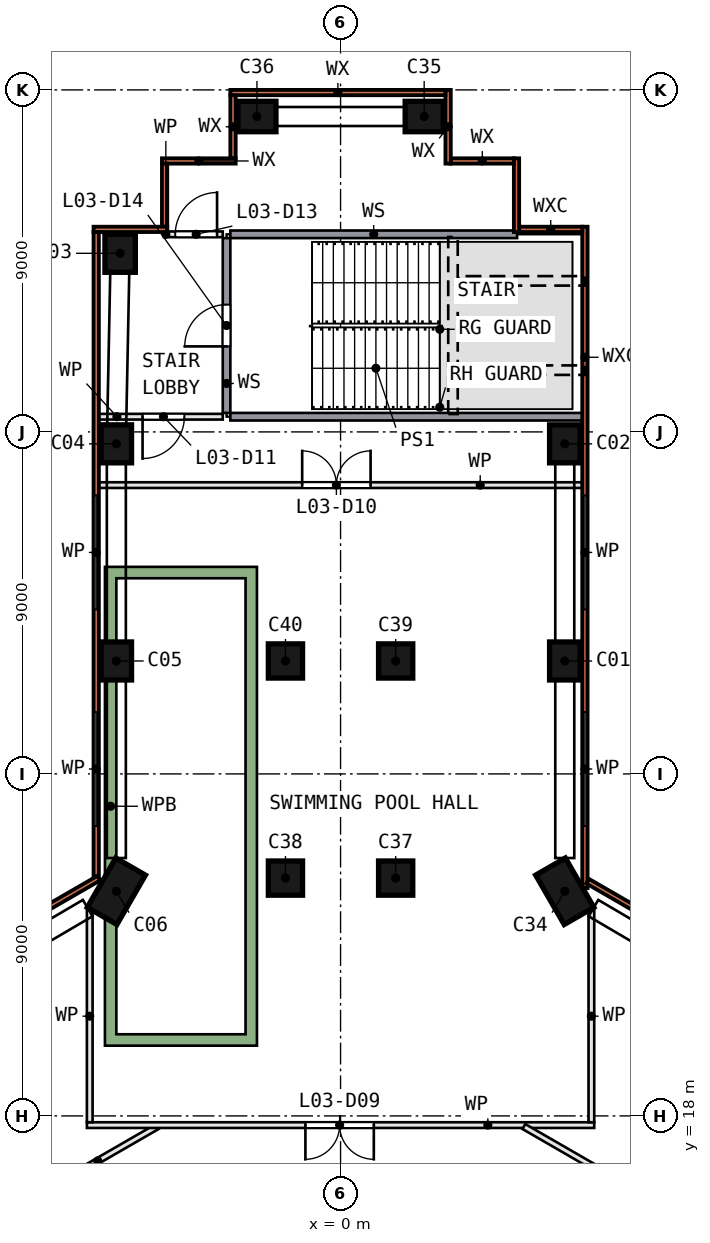
"""IFC4 building model, lengths in metres.
Left out: names, types, materials, properties, quantities, classifications, styles, units other than length and angle.
Written with IfcOpenShell. Run it as: python <this file> out.ifc"""

import sys

from ifc_helpers import new_model, si_unit, direction, frame, frame_2d, origin, origin_2d, place, context, subcontext, project, spatial, polyline, rectangle, outline, extrude, element, fill, save


model = new_model("IFC4")
c1 = context("Model", 3, precision=1e-05, world=origin(), true_north=direction((0.0, 1.0)))
c2 = subcontext(c1, "Body", "Model", "MODEL_VIEW")
j1 = project(units=[si_unit("LENGTHUNIT", "METRE"), si_unit("PLANEANGLEUNIT", "RADIAN")], contexts=[c1])
p1 = place(None, origin())
s1 = spatial("IfcSite", under=j1, at=p1, CompositionType="ELEMENT")
p2 = place(p1, origin())
s2 = spatial("IfcBuilding", under=s1, at=p2, CompositionType="ELEMENT")
p3 = place(p2, frame((0.0, 0.0, 19.0)))
s3 = spatial("IfcBuildingStorey", under=s2, at=p3, CompositionType="ELEMENT", Elevation=19.0)
for number, where, z_axis, x_axis in (
    (1, (5.9, 29.972, 0.0), (0.0, 0.0, 1.0), (0.0, 1.0, 0.0)),
    (2, (5.9, 35.686, 0.0), (0.0, 0.0, 1.0), (0.0, 1.0, 0.0)),
    (3, (-5.8, 40.7, 0.0), (0.0, 0.0, 1.0), (0.0, -1.0, 0.0)),
    (4, (-5.9, 35.686, 0.0), (0.0, 0.0, 1.0), (0.0, -1.0, 0.0)),
    (5, (-5.9, 29.972, 0.0), (0.0, 0.0, 1.0), (0.0, -1.0, 0.0)),
):
    element("IfcColumn", number, at=place(p3, frame(where, z_axis=z_axis, x_axis=x_axis)), inside=s3, PredefinedType="COLUMN", context=c2, shape_type="SweptSolid", body=[
        extrude(rectangle(XDim=1.0, YDim=0.8, at=origin_2d()), origin(), (0.0, 0.0, 1.0), 4.05),
    ])
for number, where, z_axis, x_axis in (
    (6, (-5.9, 23.912, 0.0), (0.0, 0.0, 1.0), (0.5, 0.866, 0.0)),
    (7, (5.9, 23.912, 0.0), (0.0, 0.0, 1.0), (0.5, -0.866, 0.0)),
):
    element("IfcColumn", number, at=place(p3, frame(where, z_axis=z_axis, x_axis=x_axis)), inside=s3, PredefinedType="COLUMN", context=c2, shape_type="SweptSolid", body=[
        extrude(rectangle(XDim=1.5, YDim=0.9, at=origin_2d()), origin(), (0.0, 0.0, 1.0), 4.05),
    ])
for number, where, z_axis, x_axis in (
    (8, (2.2, 44.3, 0.0), (0.0, 0.0, 1.0), (-1.0, 0.0, 0.0)),
    (9, (-2.2, 44.3, 0.0), (0.0, 0.0, 1.0), (-1.0, 0.0, 0.0)),
):
    element("IfcColumn", number, at=place(p3, frame(where, z_axis=z_axis, x_axis=x_axis)), inside=s3, PredefinedType="COLUMN", context=c2, shape_type="SweptSolid", body=[
        extrude(rectangle(XDim=1.0, YDim=0.8, at=origin_2d()), origin(), (0.0, 0.0, 1.0), 4.05),
    ])
for number, where, z_axis, x_axis in (
    (10, (1.45, 24.258, 0.0), (0.0, 0.0, 1.0), (0.0, 1.0, 0.0)),
    (11, (-1.45, 24.258, 0.0), (0.0, 0.0, 1.0), (0.0, 1.0, 0.0)),
    (12, (1.45, 29.972, 0.0), (0.0, 0.0, 1.0), (0.0, 1.0, 0.0)),
    (13, (-1.45, 29.972, 0.0), (0.0, 0.0, 1.0), (0.0, 1.0, 0.0)),
):
    element("IfcColumn", number, at=place(p3, frame(where, z_axis=z_axis, x_axis=x_axis)), inside=s3, PredefinedType="COLUMN", context=c2, shape_type="SweptSolid", body=[
        extrude(rectangle(XDim=0.9, YDim=0.9, at=origin_2d()), origin(), (0.0, 0.0, 1.0), 4.05),
    ])
p4 = place(p3, frame((6.43, 23.995, 0.0), z_axis=(0.0, 0.0, 1.0), x_axis=(0.0, 1.0, 0.0)))
e14 = element("IfcWall", 14, at=p4, inside=s3, PredefinedType="SOLIDWALL", context=c2, shape_type="SweptSolid", body=[
    extrude(rectangle(XDim=17.405, YDim=0.14, at=frame_2d((8.702, 0.0))), origin(), (0.0, 0.0, 1.0), 4.05),
])
p5 = place(p4, frame((1.634, 0.0, 0.9)))
e15 = element("IfcOpeningElement", 15, at=p5, cuts=e14, PredefinedType="OPENING", context=c2, shape_type="SweptSolid", body=[
    extrude(rectangle(XDim=3.0, YDim=2.4, at=frame_2d((1.5, 1.2))), frame((0.0, 0.08, 0.0), z_axis=(0.0, -1.0, 0.0), x_axis=(1.0, 0.0, 0.0)), (0.0, 0.0, 1.0), 0.16),
])
p6 = place(p4, frame((7.334, 0.0, 0.9)))
e16 = element("IfcOpeningElement", 16, at=p6, cuts=e14, PredefinedType="OPENING", context=c2, shape_type="SweptSolid", body=[
    extrude(rectangle(XDim=3.0, YDim=2.4, at=frame_2d((1.5, 1.2))), frame((0.0, 0.08, 0.0), z_axis=(0.0, -1.0, 0.0), x_axis=(1.0, 0.0, 0.0)), (0.0, 0.0, 1.0), 0.16),
])
p7 = place(p3, frame((6.36, 41.33, 0.0), z_axis=(0.0, 0.0, 1.0), x_axis=(-1.0, 0.0, 0.0)))
e17 = element("IfcWall", 17, at=p7, inside=s3, PredefinedType="SOLIDWALL", context=c2, shape_type="SweptSolid", body=[
    extrude(rectangle(XDim=1.66, YDim=0.14, at=frame_2d((0.83, 0.0))), origin(), (0.0, 0.0, 1.0), 4.05),
])
p8 = place(p3, frame((4.63, 41.26, 0.0), z_axis=(0.0, 0.0, 1.0), x_axis=(0.0, 1.0, 0.0)))
e18 = element("IfcWall", 18, at=p8, inside=s3, PredefinedType="SOLIDWALL", context=c2, shape_type="SweptSolid", body=[
    extrude(rectangle(XDim=1.94, YDim=0.14, at=frame_2d((0.97, 0.0))), origin(), (0.0, 0.0, 1.0), 4.05),
])
p9 = place(p3, frame((4.56, 43.13, 0.0), z_axis=(0.0, 0.0, 1.0), x_axis=(-1.0, 0.0, 0.0)))
e19 = element("IfcWall", 19, at=p9, inside=s3, PredefinedType="SOLIDWALL", context=c2, shape_type="SweptSolid", body=[
    extrude(rectangle(XDim=1.66, YDim=0.14, at=frame_2d((0.83, 0.0))), origin(), (0.0, 0.0, 1.0), 4.05),
])
p10 = place(p3, frame((2.83, 43.06, 0.0), z_axis=(0.0, 0.0, 1.0), x_axis=(0.0, 1.0, 0.0)))
e20 = element("IfcWall", 20, at=p10, inside=s3, PredefinedType="SOLIDWALL", context=c2, shape_type="SweptSolid", body=[
    extrude(rectangle(XDim=1.94, YDim=0.14, at=frame_2d((0.97, 0.0))), origin(), (0.0, 0.0, 1.0), 4.05),
])
p11 = place(p3, frame((2.76, 44.93, 0.0), z_axis=(0.0, 0.0, 1.0), x_axis=(-1.0, 0.0, 0.0)))
e21 = element("IfcWall", 21, at=p11, inside=s3, PredefinedType="SOLIDWALL", context=c2, shape_type="SweptSolid", body=[
    extrude(rectangle(XDim=5.66, YDim=0.14, at=frame_2d((2.83, 0.0))), origin(), (0.0, 0.0, 1.0), 4.05),
])
p12 = place(p3, frame((-2.83, 44.86, 0.0), z_axis=(0.0, 0.0, 1.0), x_axis=(0.0, -1.0, 0.0)))
e22 = element("IfcWall", 22, at=p12, inside=s3, PredefinedType="SOLIDWALL", context=c2, shape_type="SweptSolid", body=[
    extrude(rectangle(XDim=1.66, YDim=0.14, at=frame_2d((0.83, 0.0))), origin(), (0.0, 0.0, 1.0), 4.05),
])
p13 = place(p3, frame((-2.76, 43.13, 0.0), z_axis=(0.0, 0.0, 1.0), x_axis=(-1.0, 0.0, 0.0)))
e23 = element("IfcWall", 23, at=p13, inside=s3, PredefinedType="SOLIDWALL", context=c2, shape_type="SweptSolid", body=[
    extrude(rectangle(XDim=1.94, YDim=0.14, at=frame_2d((0.97, 0.0))), origin(), (0.0, 0.0, 1.0), 4.05),
])
p14 = place(p3, frame((-4.63, 43.06, 0.0), z_axis=(0.0, 0.0, 1.0), x_axis=(0.0, -1.0, 0.0)))
e24 = element("IfcWall", 24, at=p14, inside=s3, PredefinedType="SOLIDWALL", context=c2, shape_type="SweptSolid", body=[
    extrude(rectangle(XDim=1.66, YDim=0.14, at=frame_2d((0.83, 0.0))), origin(), (0.0, 0.0, 1.0), 4.05),
])
p15 = place(p3, frame((-4.56, 41.33, 0.0), z_axis=(0.0, 0.0, 1.0), x_axis=(-1.0, 0.0, 0.0)))
e25 = element("IfcWall", 25, at=p15, inside=s3, PredefinedType="SOLIDWALL", context=c2, shape_type="SweptSolid", body=[
    extrude(rectangle(XDim=1.94, YDim=0.14, at=frame_2d((0.97, 0.0))), origin(), (0.0, 0.0, 1.0), 4.05),
])
p16 = place(p3, frame((-6.43, 41.26, 0.0), z_axis=(0.0, 0.0, 1.0), x_axis=(0.0, -1.0, 0.0)))
e26 = element("IfcWall", 26, at=p16, inside=s3, PredefinedType="SOLIDWALL", context=c2, shape_type="SweptSolid", body=[
    extrude(rectangle(XDim=16.961, YDim=0.14, at=frame_2d((8.481, 0.0))), origin(), (0.0, 0.0, 1.0), 4.05),
])
p17 = place(p16, frame((6.931, 0.0, 0.9)))
e27 = element("IfcOpeningElement", 27, at=p17, cuts=e26, PredefinedType="OPENING", context=c2, shape_type="SweptSolid", body=[
    extrude(rectangle(XDim=3.0, YDim=2.4, at=frame_2d((1.5, 1.2))), frame((0.0, 0.08, 0.0), z_axis=(0.0, -1.0, 0.0), x_axis=(1.0, 0.0, 0.0)), (0.0, 0.0, 1.0), 0.16),
])
p18 = place(p16, frame((12.631, 0.0, 0.9)))
e28 = element("IfcOpeningElement", 28, at=p18, cuts=e26, PredefinedType="OPENING", context=c2, shape_type="SweptSolid", body=[
    extrude(rectangle(XDim=3.0, YDim=2.4, at=frame_2d((1.5, 1.2))), frame((0.0, 0.08, 0.0), z_axis=(0.0, -1.0, 0.0), x_axis=(1.0, 0.0, 0.0)), (0.0, 0.0, 1.0), 0.16),
])
p19 = place(p3, frame((-6.36, 24.258, 0.0), z_axis=(0.0, 0.0, 1.0), x_axis=(-0.866029009, -0.499993756, 0.0)))
e29 = element("IfcWall", 29, at=p19, inside=s3, PredefinedType="SOLIDWALL", context=c2, shape_type="SweptSolid", body=[
    extrude(rectangle(XDim=13.242, YDim=0.14, at=frame_2d((6.621, 0.0))), origin(), (0.0, 0.0, 1.0), 4.05),
])
p20 = place(p19, frame((1.46, 0.0, 0.9)))
e30 = element("IfcOpeningElement", 30, at=p20, cuts=e29, PredefinedType="OPENING", context=c2, shape_type="SweptSolid", body=[
    extrude(rectangle(XDim=3.6, YDim=2.4, at=frame_2d((1.8, 1.2))), frame((0.0, 0.08, 0.0), z_axis=(0.0, -1.0, 0.0), x_axis=(1.0, 0.0, 0.0)), (0.0, 0.0, 1.0), 0.16),
])
p21 = place(p19, frame((8.215, 0.0, 0.9)))
e31 = element("IfcOpeningElement", 31, at=p21, cuts=e29, PredefinedType="OPENING", context=c2, shape_type="SweptSolid", body=[
    extrude(rectangle(XDim=3.0, YDim=2.4, at=frame_2d((1.5, 1.2))), frame((0.0, 0.08, 0.0), z_axis=(0.0, -1.0, 0.0), x_axis=(1.0, 0.0, 0.0)), (0.0, 0.0, 1.0), 0.16),
])
p22 = place(p3, frame((17.586, 17.777, 0.0), z_axis=(0.0, 0.0, 1.0), x_axis=(-0.866023287, 0.500003667, 0.0)))
e32 = element("IfcWall", 32, at=p22, inside=s3, PredefinedType="SOLIDWALL", context=c2, shape_type="SweptSolid", body=[
    extrude(rectangle(XDim=12.801, YDim=0.14, at=frame_2d((6.4, 0.0))), origin(), (0.0, 0.0, 1.0), 4.05),
])
p23 = place(p3, frame((-4.823, 17.721, 0.0), z_axis=(0.0, 0.0, 1.0), x_axis=(-0.866037142, -0.499979668, 0.0)))
e33 = element("IfcWall", 33, at=p23, inside=s3, PredefinedType="PARTITIONING", context=c2, shape_type="SweptSolid", body=[
    extrude(rectangle(XDim=9.367, YDim=0.15, at=frame_2d((4.683, 0.0))), origin(), (0.0, 0.0, 1.0), 4.05),
])
p24 = place(p23, frame((3.817, 0.0, 0.0)))
e34 = element("IfcOpeningElement", 34, at=p24, cuts=e33, PredefinedType="OPENING", context=c2, shape_type="SweptSolid", body=[
    extrude(rectangle(XDim=1.8, YDim=2.1, at=frame_2d((0.9, 1.05))), frame((0.0, 0.085, 0.0), z_axis=(0.0, -1.0, 0.0), x_axis=(1.0, 0.0, 0.0)), (0.0, 0.0, 1.0), 0.17),
])
p25 = place(p3, frame((6.675, 17.758, 0.0), z_axis=(0.0, 0.0, 1.0), x_axis=(-1.0, 0.0, 0.0)))
e35 = element("IfcWall", 35, at=p25, inside=s3, PredefinedType="PARTITIONING", context=c2, shape_type="SweptSolid", body=[
    extrude(rectangle(XDim=13.35, YDim=0.15, at=frame_2d((6.675, 0.0))), origin(), (0.0, 0.0, 1.0), 4.05),
])
p26 = place(p25, frame((5.8, 0.0, 0.0)))
e36 = element("IfcOpeningElement", 36, at=p26, cuts=e35, PredefinedType="OPENING", context=c2, shape_type="SweptSolid", body=[
    extrude(rectangle(XDim=1.8, YDim=2.1, at=frame_2d((0.9, 1.05))), frame((0.0, 0.085, 0.0), z_axis=(0.0, -1.0, 0.0), x_axis=(1.0, 0.0, 0.0)), (0.0, 0.0, 1.0), 0.17),
])
p27 = place(p3, frame((-6.6, 23.415, 0.0), z_axis=(0.0, 0.0, 1.0), x_axis=(0.0, -1.0, 0.0)))
e37 = element("IfcWall", 37, at=p27, inside=s3, PredefinedType="PARTITIONING", context=c2, shape_type="SweptSolid", body=[
    extrude(rectangle(XDim=5.582, YDim=0.15, at=frame_2d((2.791, 0.0))), origin(), (0.0, 0.0, 1.0), 4.05),
])
p28 = place(p3, frame((-6.36, 34.6, 0.0), z_axis=(0.0, 0.0, 1.0), x_axis=(1.0, 0.0, 0.0)))
e38 = element("IfcWall", 38, at=p28, inside=s3, PredefinedType="PARTITIONING", context=c2, shape_type="SweptSolid", body=[
    extrude(rectangle(XDim=12.72, YDim=0.15, at=frame_2d((6.36, 0.0))), origin(), (0.0, 0.0, 1.0), 4.05),
])
p29 = place(p28, frame((5.35, 0.0, 0.0)))
e39 = element("IfcOpeningElement", 39, at=p29, cuts=e38, PredefinedType="OPENING", context=c2, shape_type="SweptSolid", body=[
    extrude(rectangle(XDim=1.8, YDim=2.1, at=frame_2d((0.9, 1.05))), frame((0.0, 0.085, 0.0), z_axis=(0.0, -1.0, 0.0), x_axis=(1.0, 0.0, 0.0)), (0.0, 0.0, 1.0), 0.17),
])
p30 = place(p3, frame((-3.1, 36.4, 0.0), z_axis=(0.0, 0.0, 1.0), x_axis=(-1.0, 0.0, 0.0)))
e40 = element("IfcWall", 40, at=p30, inside=s3, PredefinedType="PARTITIONING", context=c2, shape_type="SweptSolid", body=[
    extrude(rectangle(XDim=3.26, YDim=0.15, at=frame_2d((1.63, 0.0))), origin(), (0.0, 0.0, 1.0), 4.05),
])
p31 = place(p30, frame((1.01, 0.0, 0.0)))
e41 = element("IfcOpeningElement", 41, at=p31, cuts=e40, PredefinedType="OPENING", context=c2, shape_type="SweptSolid", body=[
    extrude(rectangle(XDim=1.1, YDim=2.1, at=frame_2d((0.55, 1.05))), frame((0.0, 0.085, 0.0), z_axis=(0.0, -1.0, 0.0), x_axis=(1.0, 0.0, 0.0)), (0.0, 0.0, 1.0), 0.17),
])
p32 = place(p3, frame((-2.9, 36.4, 0.0), z_axis=(0.0, 0.0, 1.0), x_axis=(1.0, 0.0, 0.0)))
e42 = element("IfcWall", 42, at=p32, inside=s3, PredefinedType="SOLIDWALL", context=c2, shape_type="SweptSolid", body=[
    extrude(rectangle(XDim=9.26, YDim=0.2, at=frame_2d((4.63, 0.0))), origin(), (0.0, 0.0, 1.0), 4.05),
])
p33 = place(p3, frame((-4.645, 41.2, 0.0), z_axis=(0.0, 0.0, 1.0), x_axis=(1.0, 0.0, 0.0)))
e43 = element("IfcWall", 43, at=p33, inside=s3, PredefinedType="PARTITIONING", context=c2, shape_type="SweptSolid", body=[
    extrude(rectangle(XDim=1.545, YDim=0.15, at=frame_2d((0.772, 0.0))), origin(), (0.0, 0.0, 1.0), 4.05),
])
p34 = place(p33, frame((0.295, 0.0, 0.0)))
e44 = element("IfcOpeningElement", 44, at=p34, cuts=e43, PredefinedType="OPENING", context=c2, shape_type="SweptSolid", body=[
    extrude(rectangle(XDim=1.1, YDim=2.1, at=frame_2d((0.55, 1.05))), frame((0.0, 0.085, 0.0), z_axis=(0.0, -1.0, 0.0), x_axis=(1.0, 0.0, 0.0)), (0.0, 0.0, 1.0), 0.17),
])
p35 = place(p3, frame((-3.0, 36.5, 0.0), z_axis=(0.0, 0.0, 1.0), x_axis=(0.0, 1.0, 0.0)))
e45 = element("IfcWall", 45, at=p35, inside=s3, PredefinedType="SOLIDWALL", context=c2, shape_type="SweptSolid", body=[
    extrude(rectangle(XDim=4.6, YDim=0.2, at=frame_2d((2.3, 0.0))), origin(), (0.0, 0.0, 1.0), 4.05),
])
p36 = place(p35, frame((1.75, 0.0, 0.0)))
e46 = element("IfcOpeningElement", 46, at=p36, cuts=e45, PredefinedType="OPENING", context=c2, shape_type="SweptSolid", body=[
    extrude(rectangle(XDim=1.1, YDim=2.1, at=frame_2d((0.55, 1.05))), frame((0.0, 0.11, 0.0), z_axis=(0.0, -1.0, 0.0), x_axis=(1.0, 0.0, 0.0)), (0.0, 0.0, 1.0), 0.22),
])
p37 = place(p3, frame((4.823, 17.721, 0.0), z_axis=(0.0, 0.0, 1.0), x_axis=(0.866037142, -0.499979668, 0.0)))
e47 = element("IfcWall", 47, at=p37, inside=s3, PredefinedType="PARTITIONING", context=c2, shape_type="SweptSolid", body=[
    extrude(rectangle(XDim=9.367, YDim=0.15, at=frame_2d((4.683, 0.0))), origin(), (0.0, 0.0, 1.0), 4.05),
])
p38 = place(p37, frame((4.15, 0.0, 0.0)))
e48 = element("IfcOpeningElement", 48, at=p38, cuts=e47, PredefinedType="OPENING", context=c2, shape_type="SweptSolid", body=[
    extrude(rectangle(XDim=1.0, YDim=2.1, at=frame_2d((0.5, 1.05))), frame((0.0, 0.085, 0.0), z_axis=(0.0, -1.0, 0.0), x_axis=(1.0, 0.0, 0.0)), (0.0, 0.0, 1.0), 0.17),
])
p39 = place(p3, frame((4.645, 41.2, 0.0), z_axis=(0.0, 0.0, 1.0), x_axis=(-1.0, 0.0, 0.0)))
e49 = element("IfcWall", 49, at=p39, inside=s3, PredefinedType="SOLIDWALL", context=c2, shape_type="SweptSolid", body=[
    extrude(rectangle(XDim=7.545, YDim=0.2, at=frame_2d((3.772, 0.0))), origin(), (0.0, 0.0, 1.0), 4.05),
])
p40 = place(p3, frame((6.6, 17.833, 0.0), z_axis=(0.0, 0.0, 1.0), x_axis=(0.0, 1.0, 0.0)))
e50 = element("IfcWall", 50, at=p40, inside=s3, PredefinedType="PARTITIONING", context=c2, shape_type="SweptSolid", body=[
    extrude(rectangle(XDim=5.582, YDim=0.15, at=frame_2d((2.791, 0.0))), origin(), (0.0, 0.0, 1.0), 4.05),
])
p41 = place(p3, origin())
e51 = element("IfcWall", 51, at=p41, inside=s3, PredefinedType="SOLIDWALL", context=c2, shape_type="SweptSolid", body=[
    extrude(outline(polyline([(-2.2, 19.849), (-2.2, 32.449), (-6.2, 32.449), (-6.2, 19.849), (-2.2, 19.849)]), holes=[polyline([(-2.5, 20.149), (-5.9, 20.149), (-5.9, 32.149), (-2.5, 32.149), (-2.5, 20.149)])]), origin(), (0.0, 0.0, 1.0), 1.65),
])
p42 = place(p5, origin())
e52 = element("IfcWindow", 52, at=p42, inside=s3, PartitioningType="SINGLE_PANEL", PredefinedType="WINDOW", context=c2, shape_type="SweptSolid", body=[
    extrude(rectangle(XDim=3.0, YDim=2.4, at=frame_2d((1.5, 1.2))), frame((0.0, 0.03, 0.0), z_axis=(0.0, -1.0, 0.0), x_axis=(1.0, 0.0, 0.0)), (0.0, 0.0, 1.0), 0.06),
])
fill(e15, e52)
p43 = place(p6, origin())
e53 = element("IfcWindow", 53, at=p43, inside=s3, PartitioningType="SINGLE_PANEL", PredefinedType="WINDOW", context=c2, shape_type="SweptSolid", body=[
    extrude(rectangle(XDim=3.0, YDim=2.4, at=frame_2d((1.5, 1.2))), frame((0.0, 0.03, 0.0), z_axis=(0.0, -1.0, 0.0), x_axis=(1.0, 0.0, 0.0)), (0.0, 0.0, 1.0), 0.06),
])
fill(e16, e53)
p44 = place(p17, origin())
e54 = element("IfcWindow", 54, at=p44, inside=s3, PartitioningType="SINGLE_PANEL", PredefinedType="WINDOW", context=c2, shape_type="SweptSolid", body=[
    extrude(rectangle(XDim=3.0, YDim=2.4, at=frame_2d((1.5, 1.2))), frame((0.0, 0.03, 0.0), z_axis=(0.0, -1.0, 0.0), x_axis=(1.0, 0.0, 0.0)), (0.0, 0.0, 1.0), 0.06),
])
fill(e27, e54)
p45 = place(p18, origin())
e55 = element("IfcWindow", 55, at=p45, inside=s3, PartitioningType="SINGLE_PANEL", PredefinedType="WINDOW", context=c2, shape_type="SweptSolid", body=[
    extrude(rectangle(XDim=3.0, YDim=2.4, at=frame_2d((1.5, 1.2))), frame((0.0, 0.03, 0.0), z_axis=(0.0, -1.0, 0.0), x_axis=(1.0, 0.0, 0.0)), (0.0, 0.0, 1.0), 0.06),
])
fill(e28, e55)
p46 = place(p26, origin())
e56 = element("IfcDoor", 56, at=p46, inside=s3, OperationType="DOUBLE_DOOR_SINGLE_SWING", PredefinedType="DOOR", context=c2, shape_type="SweptSolid", body=[
    extrude(rectangle(XDim=1.8, YDim=2.1, at=frame_2d((0.9, 1.05))), frame((0.0, 0.025, 0.0), z_axis=(0.0, -1.0, 0.0), x_axis=(1.0, 0.0, 0.0)), (0.0, 0.0, 1.0), 0.05),
])
fill(e36, e56)
p47 = place(p29, origin())
e57 = element("IfcDoor", 57, at=p47, inside=s3, OperationType="DOUBLE_DOOR_SINGLE_SWING", PredefinedType="DOOR", context=c2, shape_type="SweptSolid", body=[
    extrude(rectangle(XDim=1.8, YDim=2.1, at=frame_2d((0.9, 1.05))), frame((0.0, 0.025, 0.0), z_axis=(0.0, -1.0, 0.0), x_axis=(1.0, 0.0, 0.0)), (0.0, 0.0, 1.0), 0.05),
])
fill(e39, e57)
p48 = place(p31, origin())
e58 = element("IfcDoor", 58, at=p48, inside=s3, OperationType="SINGLE_SWING_RIGHT", PredefinedType="DOOR", context=c2, shape_type="SweptSolid", body=[
    extrude(rectangle(XDim=1.1, YDim=2.1, at=frame_2d((0.55, 1.05))), frame((0.0, 0.025, 0.0), z_axis=(0.0, -1.0, 0.0), x_axis=(1.0, 0.0, 0.0)), (0.0, 0.0, 1.0), 0.05),
])
fill(e41, e58)
p49 = place(p34, origin())
e59 = element("IfcDoor", 59, at=p49, inside=s3, OperationType="SINGLE_SWING_RIGHT", PredefinedType="DOOR", context=c2, shape_type="SweptSolid", body=[
    extrude(rectangle(XDim=1.1, YDim=2.1, at=frame_2d((0.55, 1.05))), frame((0.0, 0.025, 0.0), z_axis=(0.0, -1.0, 0.0), x_axis=(1.0, 0.0, 0.0)), (0.0, 0.0, 1.0), 0.05),
])
fill(e44, e59)
p50 = place(p36, origin())
e60 = element("IfcDoor", 60, at=p50, inside=s3, OperationType="SINGLE_SWING_LEFT", PredefinedType="DOOR", context=c2, shape_type="SweptSolid", body=[
    extrude(rectangle(XDim=1.1, YDim=2.1, at=frame_2d((0.55, 1.05))), frame((0.0, 0.025, 0.0), z_axis=(0.0, -1.0, 0.0), x_axis=(1.0, 0.0, 0.0)), (0.0, 0.0, 1.0), 0.05),
])
fill(e46, e60)
save(model, sys.argv[1])
